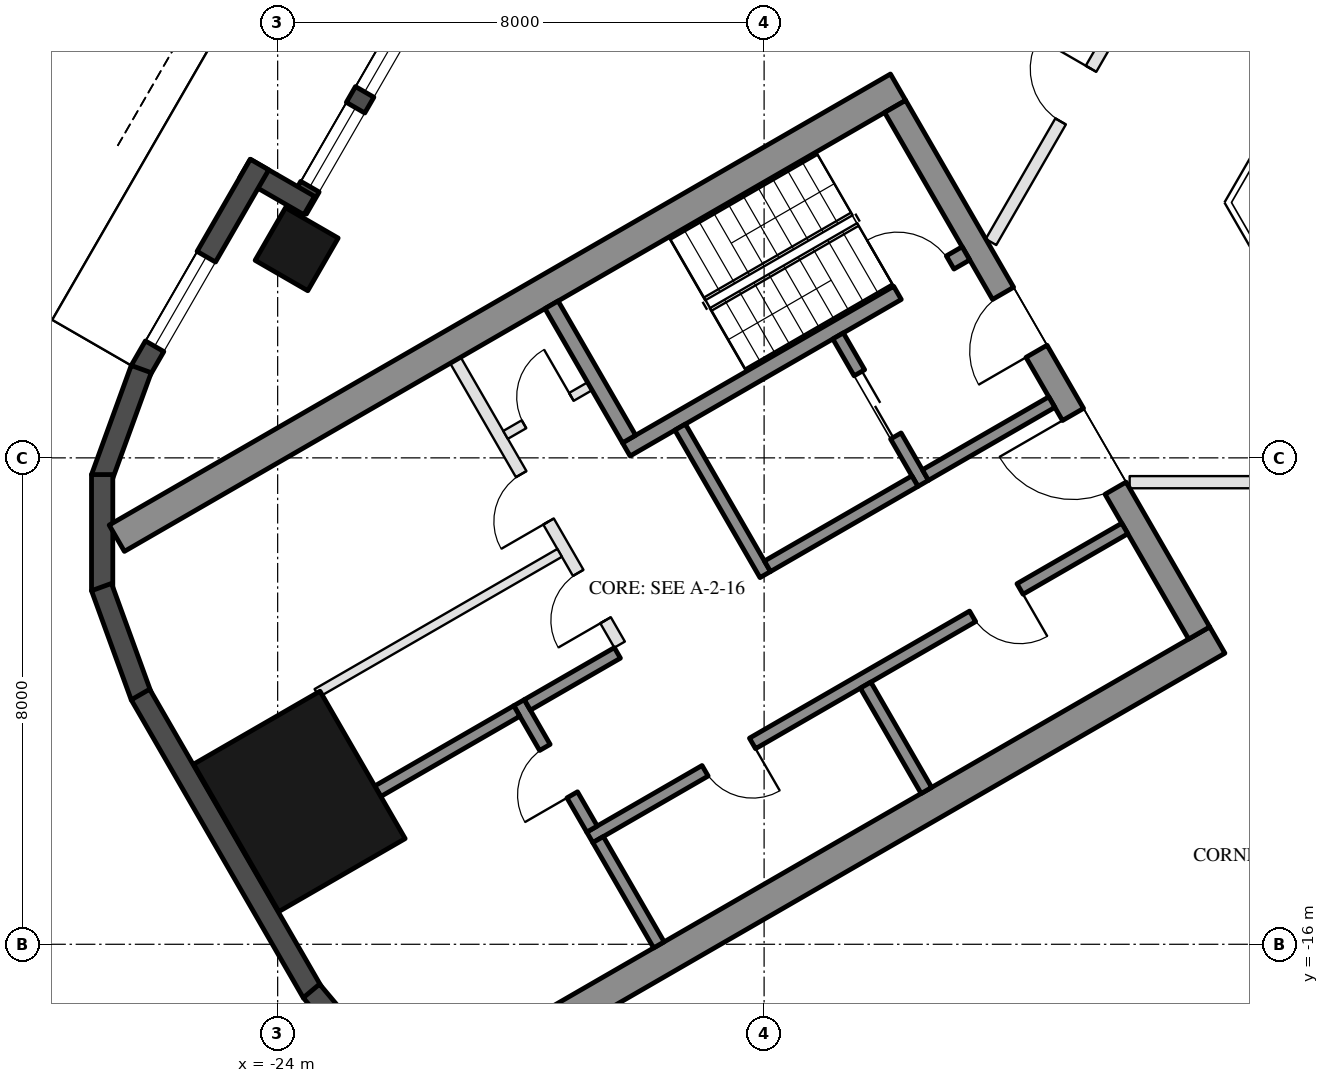
"""IFC4 building model, lengths in metres.
Left out: names, types, materials, properties, quantities, classifications, styles, units other than length and angle.
Written with IfcOpenShell. Run it as: python <this file> out.ifc"""

import sys

from ifc_helpers import new_model, si_unit, direction, frame, frame_2d, origin, origin_2d, place, context, subcontext, project, spatial, rectangle, hollow_rectangle, extrude, element, fill, save


model = new_model("IFC4")
c1 = context("Model", 3, precision=1e-05, world=origin(), true_north=direction((0.0, 1.0)))
c2 = subcontext(c1, "Body", "Model", "MODEL_VIEW")
j1 = project(units=[si_unit("LENGTHUNIT", "METRE"), si_unit("PLANEANGLEUNIT", "RADIAN")], contexts=[c1])
p1 = place(None, origin())
s1 = spatial("IfcSite", under=j1, at=p1, CompositionType="ELEMENT")
p2 = place(p1, origin())
s2 = spatial("IfcBuilding", under=s1, at=p2, CompositionType="ELEMENT")
p3 = place(p2, frame((0.0, 0.0, 79.8)))
s3 = spatial("IfcBuildingStorey", under=s2, at=p3, CompositionType="ELEMENT", Elevation=79.8)
p4 = place(p3, frame((-23.688, -4.568, 0.0), z_axis=(0.0, 0.0, 1.0), x_axis=(0.5, 0.866025403784, 0.0)))
e1 = element("IfcColumn", 1, at=p4, inside=s3, PredefinedType="COLUMN", context=c2, shape_type="SweptSolid", body=[
    extrude(hollow_rectangle(XDim=1.0, YDim=1.0, WallThickness=0.045, at=origin_2d()), origin(), (0.0, 0.0, 1.0), 3.7),
])
p5 = place(p3, frame((-23.643, -13.65, 0.0), z_axis=(0.0, 0.0, 1.0), x_axis=(-0.5, 0.866025403784, 0.0)))
e2 = element("IfcColumn", 2, at=p5, inside=s3, PredefinedType="COLUMN", context=c2, shape_type="SweptSolid", body=[
    extrude(hollow_rectangle(XDim=2.8, YDim=2.4, WallThickness=0.07, at=origin_2d()), origin(), (0.0, 0.0, 1.0), 3.7),
])
p6 = place(p3, frame((-20.309, 1.934, 0.0), z_axis=(0.0, 0.0, 1.0), x_axis=(-0.499992114976, -0.866029956157, 0.0)))
e3 = element("IfcWall", 3, at=p6, inside=s3, PredefinedType="SOLIDWALL", context=c2, shape_type="SweptSolid", body=[
    extrude(rectangle(XDim=6.74, YDim=0.35, at=frame_2d((3.37, 0.0))), origin(), (0.0, 0.0, 1.0), 3.55),
])
p7 = place(p6, frame((0.32, 0.0, 0.0)))
e4 = element("IfcOpeningElement", 4, at=p7, cuts=e3, PredefinedType="OPENING", context=c2, shape_type="SweptSolid", body=[
    extrude(rectangle(XDim=2.4, YDim=2.4, at=frame_2d((1.2, 1.2))), frame((0.0, 0.185, 0.0), z_axis=(0.0, -1.0, 0.0), x_axis=(1.0, 0.0, 0.0)), (0.0, 0.0, 1.0), 0.37),
])
p8 = place(p6, frame((3.02, 0.0, 0.3)))
e5 = element("IfcOpeningElement", 5, at=p8, cuts=e3, PredefinedType="OPENING", context=c2, shape_type="SweptSolid", body=[
    extrude(rectangle(XDim=1.5, YDim=2.65, at=frame_2d((0.75, 1.325))), frame((0.0, 0.185, 0.0), z_axis=(0.0, -1.0, 0.0), x_axis=(1.0, 0.0, 0.0)), (0.0, 0.0, 1.0), 0.37),
])
p9 = place(p6, frame((4.82, 0.0, 0.3)))
e6 = element("IfcOpeningElement", 6, at=p9, cuts=e3, PredefinedType="OPENING", context=c2, shape_type="SweptSolid", body=[
    extrude(rectangle(XDim=1.5, YDim=2.65, at=frame_2d((0.75, 1.325))), frame((0.0, 0.185, 0.0), z_axis=(0.0, -1.0, 0.0), x_axis=(1.0, 0.0, 0.0)), (0.0, 0.0, 1.0), 0.37),
])
p10 = place(p3, frame((-23.481, -3.85, 0.0), z_axis=(0.0, 0.0, 1.0), x_axis=(-0.866092288191, 0.499884134912, 0.0)))
e7 = element("IfcWall", 7, at=p10, inside=s3, PredefinedType="SOLIDWALL", context=c2, shape_type="SweptSolid", body=[
    extrude(rectangle(XDim=1.22, YDim=0.35, at=frame_2d((0.61, 0.0))), origin(), (0.0, 0.0, 1.0), 3.55),
])
p11 = place(p3, frame((-24.299, -3.176, 0.0), z_axis=(0.0, 0.0, 1.0), x_axis=(-0.500028278809, -0.866009076391, 0.0)))
e8 = element("IfcWall", 8, at=p11, inside=s3, PredefinedType="SOLIDWALL", context=c2, shape_type="SweptSolid", body=[
    extrude(rectangle(XDim=3.916, YDim=0.35, at=frame_2d((1.958, 0.0))), origin(), (0.0, 0.0, 1.0), 3.55),
])
p12 = place(p11, frame((1.75, 0.0, 0.3)))
e9 = element("IfcOpeningElement", 9, at=p12, cuts=e8, PredefinedType="OPENING", context=c2, shape_type="SweptSolid", body=[
    extrude(rectangle(XDim=1.7, YDim=2.65, at=frame_2d((0.85, 1.325))), frame((0.0, 0.185, 0.0), z_axis=(0.0, -1.0, 0.0), x_axis=(1.0, 0.0, 0.0)), (0.0, 0.0, 1.0), 0.37),
])
for number, where, z_axis, x_axis in (
    (10, (-26.244, -6.54, 0.0), (0.0, 0.0, 1.0), (-0.342, -0.94, 0.0)),
    (11, (-26.886, -8.275, 0.0), (0.0, 0.0, 1.0), (0.0, -1.0, 0.0)),
    (12, (-26.897, -10.125, 0.0), (0.0, 0.0, 1.0), (0.342, -0.94, 0.0)),
):
    element("IfcWall", number, at=place(p3, frame(where, z_axis=z_axis, x_axis=x_axis)), inside=s3, PredefinedType="SOLIDWALL", context=c2, shape_type="SweptSolid", body=[
        extrude(rectangle(XDim=1.91, YDim=0.35, at=frame_2d((0.955, 0.0))), origin(), (0.0, 0.0, 1.0), 3.55),
    ])
p13 = place(p3, frame((-26.257, -11.893, 0.0), z_axis=(0.0, 0.0, 1.0), x_axis=(0.500018773155, -0.866014564827, 0.0)))
e13 = element("IfcWall", 13, at=p13, inside=s3, PredefinedType="SOLIDWALL", context=c2, shape_type="SweptSolid", body=[
    extrude(rectangle(XDim=5.658, YDim=0.35, at=frame_2d((2.829, 0.0))), origin(), (0.0, 0.0, 1.0), 3.55),
])
p14 = place(p3, frame((-23.445, -16.768, 0.0), z_axis=(0.0, 0.0, 1.0), x_axis=(0.642733291068, -0.76609001857, 0.0)))
e14 = element("IfcWall", 14, at=p14, inside=s3, PredefinedType="SOLIDWALL", context=c2, shape_type="SweptSolid", body=[
    extrude(rectangle(XDim=1.91, YDim=0.35, at=frame_2d((0.955, 0.0))), origin(), (0.0, 0.0, 1.0), 3.55),
])
for number, where, z_axis, x_axis in (
    (15, (-13.797, -1.903, 0.0), (0.0, 0.0, 1.0), (-0.866, -0.5, 0.0)),
    (16, (-8.547, -10.997, 0.0), (0.0, 0.0, 1.0), (-0.866, -0.5, 0.0)),
):
    element("IfcWall", number, at=place(p3, frame(where, z_axis=z_axis, x_axis=x_axis)), inside=s3, PredefinedType="SHEAR", context=c2, shape_type="SweptSolid", body=[
        extrude(rectangle(XDim=14.837, YDim=0.5, at=frame_2d((7.418, 0.0))), origin(), (0.0, 0.0, 1.0), 3.5),
    ])
p15 = place(p3, frame((-13.845, -2.22, 0.0), z_axis=(0.0, 0.0, 1.0), x_axis=(0.500004234368, -0.866022959057, 0.0)))
e17 = element("IfcWall", 17, at=p15, inside=s3, PredefinedType="SHEAR", context=c2, shape_type="SweptSolid", body=[
    extrude(rectangle(XDim=10.0, YDim=0.4, at=frame_2d((5.0, 0.0))), origin(), (0.0, 0.0, 1.0), 3.5),
])
p16 = place(p15, frame((3.55, 0.0, 0.0)))
e18 = element("IfcOpeningElement", 18, at=p16, cuts=e17, PredefinedType="OPENING", context=c2, shape_type="SweptSolid", body=[
    extrude(rectangle(XDim=1.1, YDim=2.1, at=frame_2d((0.55, 1.05))), frame((0.0, 0.21, 0.0), z_axis=(0.0, -1.0, 0.0), x_axis=(1.0, 0.0, 0.0)), (0.0, 0.0, 1.0), 0.42),
])
p17 = place(p15, frame((5.85, 0.0, 0.0)))
e19 = element("IfcOpeningElement", 19, at=p17, cuts=e17, PredefinedType="OPENING", context=c2, shape_type="SweptSolid", body=[
    extrude(rectangle(XDim=1.4, YDim=2.1, at=frame_2d((0.7, 1.05))), frame((0.0, 0.21, 0.0), z_axis=(0.0, -1.0, 0.0), x_axis=(1.0, 0.0, 0.0)), (0.0, 0.0, 1.0), 0.42),
])
p18 = place(p3, frame((-12.681, -4.636, 0.0), z_axis=(0.0, 0.0, 1.0), x_axis=(-0.866021702275, -0.500006411147, 0.0)))
e20 = element("IfcWall", 20, at=p18, inside=s3, PredefinedType="SHEAR", context=c2, shape_type="SweptSolid", body=[
    extrude(rectangle(XDim=6.45, YDim=0.25, at=frame_2d((3.225, 0.0))), origin(), (0.0, 0.0, 1.0), 3.5),
])
p19 = place(p18, frame((0.3, 0.0, 0.0)))
e21 = element("IfcOpeningElement", 21, at=p19, cuts=e20, PredefinedType="OPENING", context=c2, shape_type="SweptSolid", body=[
    extrude(rectangle(XDim=1.0, YDim=2.1, at=frame_2d((0.5, 1.05))), frame((0.0, 0.135, 0.0), z_axis=(0.0, -1.0, 0.0), x_axis=(1.0, 0.0, 0.0)), (0.0, 0.0, 1.0), 0.27),
])
p20 = place(p3, frame((-19.496, -5.482, 0.0), z_axis=(0.0, 0.0, 1.0), x_axis=(0.499990435942, -0.866030925526, 0.0)))
e22 = element("IfcWall", 22, at=p20, inside=s3, PredefinedType="SHEAR", context=c2, shape_type="SweptSolid", body=[
    extrude(rectangle(XDim=2.55, YDim=0.25, at=frame_2d((1.275, 0.0))), origin(), (0.0, 0.0, 1.0), 3.5),
])
p21 = place(p3, frame((-17.381, -7.495, 0.0), z_axis=(0.0, 0.0, 1.0), x_axis=(0.500011755427, -0.866018616679, 0.0)))
e23 = element("IfcWall", 23, at=p21, inside=s3, PredefinedType="SHEAR", context=c2, shape_type="SweptSolid", body=[
    extrude(rectangle(XDim=2.8, YDim=0.2, at=frame_2d((1.4, 0.0))), origin(), (0.0, 0.0, 1.0), 3.5),
])
p22 = place(p3, frame((-14.783, -5.995, 0.0), z_axis=(0.0, 0.0, 1.0), x_axis=(0.49994636267, -0.866056369097, 0.0)))
e24 = element("IfcWall", 24, at=p22, inside=s3, PredefinedType="SHEAR", context=c2, shape_type="SweptSolid", body=[
    extrude(rectangle(XDim=2.8, YDim=0.2, at=frame_2d((1.4, 0.0))), origin(), (0.0, 0.0, 1.0), 3.5),
])
p23 = place(p22, frame((0.7, 0.0, 0.0)))
e25 = element("IfcOpeningElement", 25, at=p23, cuts=e24, PredefinedType="OPENING", context=c2, shape_type="SweptSolid", body=[
    extrude(rectangle(XDim=1.2, YDim=2.1, at=frame_2d((0.6, 1.05))), frame((0.0, 0.11, 0.0), z_axis=(0.0, -1.0, 0.0), x_axis=(1.0, 0.0, 0.0)), (0.0, 0.0, 1.0), 0.22),
])
p24 = place(p3, frame((-13.52, -8.383, 0.0), z_axis=(0.0, 0.0, 1.0), x_axis=(-0.866034573852, -0.49998411664, 0.0)))
e26 = element("IfcWall", 26, at=p24, inside=s3, PredefinedType="SHEAR", context=c2, shape_type="SweptSolid", body=[
    extrude(rectangle(XDim=2.8, YDim=0.2, at=frame_2d((1.4, 0.0))), origin(), (0.0, 0.0, 1.0), 3.5),
])
p25 = place(p3, frame((-11.268, -7.083, 0.0), z_axis=(0.0, 0.0, 1.0), x_axis=(-0.866050077142, -0.499957262057, 0.0)))
e27 = element("IfcWall", 27, at=p25, inside=s3, PredefinedType="SHEAR", context=c2, shape_type="SweptSolid", body=[
    extrude(rectangle(XDim=2.4, YDim=0.2, at=frame_2d((1.2, 0.0))), origin(), (0.0, 0.0, 1.0), 3.5),
])
p26 = place(p3, frame((-10.068, -9.162, 0.0), z_axis=(0.0, 0.0, 1.0), x_axis=(-0.866032725843, -0.499987317609, 0.0)))
e28 = element("IfcWall", 28, at=p26, inside=s3, PredefinedType="SHEAR", context=c2, shape_type="SweptSolid", body=[
    extrude(rectangle(XDim=10.16, YDim=0.2, at=frame_2d((5.08, 0.0))), origin(), (0.0, 0.0, 1.0), 3.5),
])
p27 = place(p26, frame((1.99, 0.0, 0.0)))
e29 = element("IfcOpeningElement", 29, at=p27, cuts=e28, PredefinedType="OPENING", context=c2, shape_type="SweptSolid", body=[
    extrude(rectangle(XDim=0.9, YDim=2.1, at=frame_2d((0.45, 1.05))), frame((0.0, 0.11, 0.0), z_axis=(0.0, -1.0, 0.0), x_axis=(1.0, 0.0, 0.0)), (0.0, 0.0, 1.0), 0.22),
])
p28 = place(p26, frame((7.07, 0.0, 0.0)))
e30 = element("IfcOpeningElement", 30, at=p28, cuts=e28, PredefinedType="OPENING", context=c2, shape_type="SweptSolid", body=[
    extrude(rectangle(XDim=0.9, YDim=2.1, at=frame_2d((0.45, 1.05))), frame((0.0, 0.11, 0.0), z_axis=(0.0, -1.0, 0.0), x_axis=(1.0, 0.0, 0.0)), (0.0, 0.0, 1.0), 0.22),
])
p29 = place(p3, frame((-20.031, -12.026, 0.0), z_axis=(0.0, 0.0, 1.0), x_axis=(0.500033551112, -0.866006032174, 0.0)))
e31 = element("IfcWall", 31, at=p29, inside=s3, PredefinedType="SHEAR", context=c2, shape_type="SweptSolid", body=[
    extrude(rectangle(XDim=2.4, YDim=0.2, at=frame_2d((1.2, 0.0))), origin(), (0.0, 0.0, 1.0), 3.5),
])
p30 = place(p29, frame((0.85, 0.0, 0.0)))
e32 = element("IfcOpeningElement", 32, at=p30, cuts=e31, PredefinedType="OPENING", context=c2, shape_type="SweptSolid", body=[
    extrude(rectangle(XDim=0.9, YDim=2.1, at=frame_2d((0.45, 1.05))), frame((0.0, 0.11, 0.0), z_axis=(0.0, -1.0, 0.0), x_axis=(1.0, 0.0, 0.0)), (0.0, 0.0, 1.0), 0.22),
])
p31 = place(p3, frame((-18.413, -11.208, 0.0), z_axis=(0.0, 0.0, 1.0), x_axis=(-0.866038183914, -0.499977863513, 0.0)))
e33 = element("IfcWall", 33, at=p31, inside=s3, PredefinedType="SHEAR", context=c2, shape_type="SweptSolid", body=[
    extrude(rectangle(XDim=1.71, YDim=0.2, at=frame_2d((0.855, 0.0))), origin(), (0.0, 0.0, 1.0), 3.5),
])
for number, where, z_axis, x_axis in (
    (34, (-14.331, -11.738, 0.0), (0.0, 0.0, 1.0), (0.5, -0.866, 0.0)),
    (35, (-18.73, -14.278, 0.0), (0.0, 0.0, 1.0), (0.5, -0.866, 0.0)),
):
    element("IfcWall", number, at=place(p3, frame(where, z_axis=z_axis, x_axis=x_axis)), inside=s3, PredefinedType="SHEAR", context=c2, shape_type="SweptSolid", body=[
        extrude(rectangle(XDim=2.0, YDim=0.2, at=frame_2d((1.0, 0.0))), origin(), (0.0, 0.0, 1.0), 3.5),
    ])
p32 = place(p3, frame((-20.067, -12.163, 0.0), z_axis=(0.0, 0.0, 1.0), x_axis=(-0.866060851709, -0.499938597367, 0.0)))
e36 = element("IfcWall", 36, at=p32, inside=s3, PredefinedType="SHEAR", context=c2, shape_type="SweptSolid", body=[
    extrude(rectangle(XDim=2.64, YDim=0.2, at=frame_2d((1.32, 0.0))), origin(), (0.0, 0.0, 1.0), 3.5),
])
p33 = place(p3, frame((-21.076, -6.395, 0.0), z_axis=(0.0, 0.0, 1.0), x_axis=(0.50001468107, -0.866016927499, 0.0)))
e37 = element("IfcWall", 37, at=p33, inside=s3, PredefinedType="PARTITIONING", context=c2, shape_type="SweptSolid", body=[
    extrude(rectangle(XDim=5.4, YDim=0.2, at=frame_2d((2.7, 0.0))), origin(), (0.0, 0.0, 1.0), 3.5),
])
p34 = place(p33, frame((2.163, 0.0, 0.0)))
e38 = element("IfcOpeningElement", 38, at=p34, cuts=e37, PredefinedType="OPENING", context=c2, shape_type="SweptSolid", body=[
    extrude(rectangle(XDim=0.9, YDim=2.1, at=frame_2d((0.45, 1.05))), frame((0.0, 0.11, 0.0), z_axis=(0.0, -1.0, 0.0), x_axis=(1.0, 0.0, 0.0)), (0.0, 0.0, 1.0), 0.22),
])
p35 = place(p33, frame((4.038, 0.0, 0.0)))
e39 = element("IfcOpeningElement", 39, at=p35, cuts=e37, PredefinedType="OPENING", context=c2, shape_type="SweptSolid", body=[
    extrude(rectangle(XDim=0.9, YDim=2.1, at=frame_2d((0.45, 1.05))), frame((0.0, 0.11, 0.0), z_axis=(0.0, -1.0, 0.0), x_axis=(1.0, 0.0, 0.0)), (0.0, 0.0, 1.0), 0.22),
])
p36 = place(p3, frame((-18.866, -6.822, 0.0), z_axis=(0.0, 0.0, 1.0), x_axis=(-0.866028054938, -0.499995408039, 0.0)))
e40 = element("IfcWall", 40, at=p36, inside=s3, PredefinedType="PARTITIONING", context=c2, shape_type="SweptSolid", body=[
    extrude(rectangle(XDim=1.6, YDim=0.15, at=frame_2d((0.8, 0.0))), origin(), (0.0, 0.0, 1.0), 3.5),
])
p37 = place(p36, frame((0.35, 0.0, 0.0)))
e41 = element("IfcOpeningElement", 41, at=p37, cuts=e40, PredefinedType="OPENING", context=c2, shape_type="SweptSolid", body=[
    extrude(rectangle(XDim=0.9, YDim=2.1, at=frame_2d((0.45, 1.05))), frame((0.0, 0.085, 0.0), z_axis=(0.0, -1.0, 0.0), x_axis=(1.0, 0.0, 0.0)), (0.0, 0.0, 1.0), 0.17),
])
p38 = place(p3, frame((-19.363, -9.562, 0.0), z_axis=(0.0, 0.0, 1.0), x_axis=(-0.86601185002, -0.500023475074, 0.0)))
e42 = element("IfcWall", 42, at=p38, inside=s3, PredefinedType="PARTITIONING", context=c2, shape_type="SweptSolid", body=[
    extrude(rectangle(XDim=4.61, YDim=0.15, at=frame_2d((2.305, 0.0))), origin(), (0.0, 0.0, 1.0), 3.5),
])
p39 = place(p3, frame((-2.702, -8.4, 0.0), z_axis=(0.0, 0.0, 1.0), x_axis=(-1.0, 0.0, 0.0)))
e43 = element("IfcWall", 43, at=p39, inside=s3, PredefinedType="PARTITIONING", context=c2, shape_type="SweptSolid", body=[
    extrude(rectangle(XDim=7.286, YDim=0.2, at=frame_2d((3.643, 0.0))), origin(), (0.0, 0.0, 1.0), 2.95),
])
p40 = place(p39, frame((3.143, 0.0, 0.0)))
e44 = element("IfcOpeningElement", 44, at=p40, cuts=e43, PredefinedType="OPENING", context=c2, shape_type="SweptSolid", body=[
    extrude(rectangle(XDim=1.0, YDim=2.1, at=frame_2d((0.5, 1.05))), frame((0.0, 0.11, 0.0), z_axis=(0.0, -1.0, 0.0), x_axis=(1.0, 0.0, 0.0)), (0.0, 0.0, 1.0), 0.22),
])
p41 = place(p3, frame((-12.269, -4.45, 0.0), z_axis=(0.0, 0.0, 1.0), x_axis=(0.500016608416, 0.866015814699, 0.0)))
e45 = element("IfcWall", 45, at=p41, inside=s3, PredefinedType="PARTITIONING", context=c2, shape_type="SweptSolid", body=[
    extrude(rectangle(XDim=5.58, YDim=0.2, at=frame_2d((2.79, 0.0))), origin(), (0.0, 0.0, 1.0), 2.95),
])
p42 = place(p41, frame((2.29, 0.0, 0.0)))
e46 = element("IfcOpeningElement", 46, at=p42, cuts=e45, PredefinedType="OPENING", context=c2, shape_type="SweptSolid", body=[
    extrude(rectangle(XDim=1.0, YDim=2.1, at=frame_2d((0.5, 1.05))), frame((0.0, 0.11, 0.0), z_axis=(0.0, -1.0, 0.0), x_axis=(1.0, 0.0, 0.0)), (0.0, 0.0, 1.0), 0.22),
])
p43 = place(p8, origin())
e47 = element("IfcWindow", 47, at=p43, inside=s3, PartitioningType="SINGLE_PANEL", PredefinedType="WINDOW", context=c2, shape_type="SweptSolid", body=[
    extrude(rectangle(XDim=1.5, YDim=2.65, at=frame_2d((0.75, 1.325))), frame((0.0, 0.03, 0.0), z_axis=(0.0, -1.0, 0.0), x_axis=(1.0, 0.0, 0.0)), (0.0, 0.0, 1.0), 0.06),
])
fill(e5, e47)
p44 = place(p9, origin())
e48 = element("IfcWindow", 48, at=p44, inside=s3, PartitioningType="SINGLE_PANEL", PredefinedType="WINDOW", context=c2, shape_type="SweptSolid", body=[
    extrude(rectangle(XDim=1.5, YDim=2.65, at=frame_2d((0.75, 1.325))), frame((0.0, 0.03, 0.0), z_axis=(0.0, -1.0, 0.0), x_axis=(1.0, 0.0, 0.0)), (0.0, 0.0, 1.0), 0.06),
])
fill(e6, e48)
p45 = place(p12, origin())
e49 = element("IfcWindow", 49, at=p45, inside=s3, PartitioningType="SINGLE_PANEL", PredefinedType="WINDOW", context=c2, shape_type="SweptSolid", body=[
    extrude(rectangle(XDim=1.7, YDim=2.65, at=frame_2d((0.85, 1.325))), frame((0.0, 0.03, 0.0), z_axis=(0.0, -1.0, 0.0), x_axis=(1.0, 0.0, 0.0)), (0.0, 0.0, 1.0), 0.06),
])
fill(e9, e49)
p46 = place(p23, origin())
e50 = element("IfcDoor", 50, at=p46, inside=s3, OperationType="DOUBLE_DOOR_SLIDING", PredefinedType="DOOR", context=c2, shape_type="SweptSolid", body=[
    extrude(rectangle(XDim=1.2, YDim=2.1, at=frame_2d((0.6, 1.05))), frame((0.0, 0.025, 0.0), z_axis=(0.0, -1.0, 0.0), x_axis=(1.0, 0.0, 0.0)), (0.0, 0.0, 1.0), 0.05),
])
fill(e25, e50)
p47 = place(p37, frame((0.9, 0.0, 0.0), z_axis=(0.0, 0.0, 1.0), x_axis=(-1.0, 0.0, 0.0)))
e51 = element("IfcDoor", 51, at=p47, inside=s3, OperationType="SINGLE_SWING_RIGHT", PredefinedType="DOOR", context=c2, shape_type="SweptSolid", body=[
    extrude(rectangle(XDim=0.9, YDim=2.1, at=frame_2d((0.45, 1.05))), frame((0.0, 0.025, 0.0), z_axis=(0.0, -1.0, 0.0), x_axis=(1.0, 0.0, 0.0)), (0.0, 0.0, 1.0), 0.05),
])
fill(e41, e51)
p48 = place(p27, origin())
e52 = element("IfcDoor", 52, at=p48, inside=s3, OperationType="SINGLE_SWING_LEFT", PredefinedType="DOOR", context=c2, shape_type="SweptSolid", body=[
    extrude(rectangle(XDim=0.9, YDim=2.1, at=frame_2d((0.45, 1.05))), frame((0.0, 0.025, 0.0), z_axis=(0.0, -1.0, 0.0), x_axis=(1.0, 0.0, 0.0)), (0.0, 0.0, 1.0), 0.05),
])
fill(e29, e52)
p49 = place(p28, origin())
e53 = element("IfcDoor", 53, at=p49, inside=s3, OperationType="SINGLE_SWING_LEFT", PredefinedType="DOOR", context=c2, shape_type="SweptSolid", body=[
    extrude(rectangle(XDim=0.9, YDim=2.1, at=frame_2d((0.45, 1.05))), frame((0.0, 0.025, 0.0), z_axis=(0.0, -1.0, 0.0), x_axis=(1.0, 0.0, 0.0)), (0.0, 0.0, 1.0), 0.05),
])
fill(e30, e53)
p50 = place(p30, frame((0.9, 0.0, 0.0), z_axis=(0.0, 0.0, 1.0), x_axis=(-1.0, 0.0, 0.0)))
e54 = element("IfcDoor", 54, at=p50, inside=s3, OperationType="SINGLE_SWING_LEFT", PredefinedType="DOOR", context=c2, shape_type="SweptSolid", body=[
    extrude(rectangle(XDim=0.9, YDim=2.1, at=frame_2d((0.45, 1.05))), frame((0.0, 0.025, 0.0), z_axis=(0.0, -1.0, 0.0), x_axis=(1.0, 0.0, 0.0)), (0.0, 0.0, 1.0), 0.05),
])
fill(e32, e54)
p51 = place(p34, frame((0.9, 0.0, 0.0), z_axis=(0.0, 0.0, 1.0), x_axis=(-1.0, 0.0, 0.0)))
e55 = element("IfcDoor", 55, at=p51, inside=s3, OperationType="SINGLE_SWING_LEFT", PredefinedType="DOOR", context=c2, shape_type="SweptSolid", body=[
    extrude(rectangle(XDim=0.9, YDim=2.1, at=frame_2d((0.45, 1.05))), frame((0.0, 0.025, 0.0), z_axis=(0.0, -1.0, 0.0), x_axis=(1.0, 0.0, 0.0)), (0.0, 0.0, 1.0), 0.05),
])
fill(e38, e55)
p52 = place(p35, frame((0.9, 0.0, 0.0), z_axis=(0.0, 0.0, 1.0), x_axis=(-1.0, 0.0, 0.0)))
e56 = element("IfcDoor", 56, at=p52, inside=s3, OperationType="SINGLE_SWING_LEFT", PredefinedType="DOOR", context=c2, shape_type="SweptSolid", body=[
    extrude(rectangle(XDim=0.9, YDim=2.1, at=frame_2d((0.45, 1.05))), frame((0.0, 0.025, 0.0), z_axis=(0.0, -1.0, 0.0), x_axis=(1.0, 0.0, 0.0)), (0.0, 0.0, 1.0), 0.05),
])
fill(e39, e56)
p53 = place(p16, frame((1.1, 0.0, 0.0), z_axis=(0.0, 0.0, 1.0), x_axis=(-1.0, 0.0, 0.0)))
e57 = element("IfcDoor", 57, at=p53, inside=s3, OperationType="SINGLE_SWING_LEFT", PredefinedType="DOOR", context=c2, shape_type="SweptSolid", body=[
    extrude(rectangle(XDim=1.1, YDim=2.1, at=frame_2d((0.55, 1.05))), frame((0.0, 0.025, 0.0), z_axis=(0.0, -1.0, 0.0), x_axis=(1.0, 0.0, 0.0)), (0.0, 0.0, 1.0), 0.05),
])
fill(e18, e57)
p54 = place(p17, frame((1.4, 0.0, 0.0), z_axis=(0.0, 0.0, 1.0), x_axis=(-1.0, 0.0, 0.0)))
e58 = element("IfcDoor", 58, at=p54, inside=s3, OperationType="DOUBLE_DOOR_SINGLE_SWING", PredefinedType="DOOR", context=c2, shape_type="SweptSolid", body=[
    extrude(rectangle(XDim=1.4, YDim=2.1, at=frame_2d((0.7, 1.05))), frame((0.0, 0.025, 0.0), z_axis=(0.0, -1.0, 0.0), x_axis=(1.0, 0.0, 0.0)), (0.0, 0.0, 1.0), 0.05),
])
fill(e19, e58)
p55 = place(p19, frame((1.0, 0.0, 0.0), z_axis=(0.0, 0.0, 1.0), x_axis=(-1.0, 0.0, 0.0)))
e59 = element("IfcDoor", 59, at=p55, inside=s3, OperationType="SINGLE_SWING_LEFT", PredefinedType="DOOR", context=c2, shape_type="SweptSolid", body=[
    extrude(rectangle(XDim=1.0, YDim=2.1, at=frame_2d((0.5, 1.05))), frame((0.0, 0.025, 0.0), z_axis=(0.0, -1.0, 0.0), x_axis=(1.0, 0.0, 0.0)), (0.0, 0.0, 1.0), 0.05),
])
fill(e21, e59)
p56 = place(p42, origin())
e60 = element("IfcDoor", 60, at=p56, inside=s3, OperationType="SINGLE_SWING_RIGHT", PredefinedType="DOOR", context=c2, shape_type="SweptSolid", body=[
    extrude(rectangle(XDim=1.0, YDim=2.1, at=frame_2d((0.5, 1.05))), frame((0.0, 0.025, 0.0), z_axis=(0.0, -1.0, 0.0), x_axis=(1.0, 0.0, 0.0)), (0.0, 0.0, 1.0), 0.05),
])
fill(e46, e60)
save(model, sys.argv[1])
